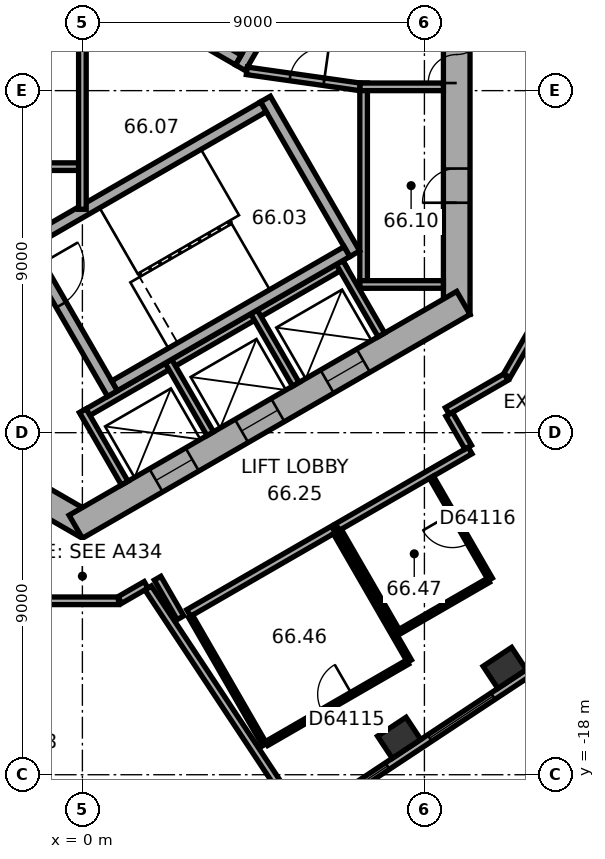
"""IFC4 building model, lengths in metres.
Left out: names, types, materials, properties, quantities, classifications, styles, units other than length and angle.
Written with IfcOpenShell. Run it as: python <this file> out.ifc"""

import sys

from ifc_helpers import new_model, si_unit, direction, frame, frame_2d, origin, origin_2d, place, context, subcontext, project, spatial, rectangle, extrude, element, fill, save


model = new_model("IFC4")
c1 = context("Model", 3, precision=1e-05, world=origin(), true_north=direction((0.0, 1.0)))
c2 = subcontext(c1, "Body", "Model", "MODEL_VIEW")
j1 = project(units=[si_unit("LENGTHUNIT", "METRE"), si_unit("PLANEANGLEUNIT", "RADIAN")], contexts=[c1])
p1 = place(None, origin())
s1 = spatial("IfcSite", under=j1, at=p1, CompositionType="ELEMENT")
p2 = place(p1, origin())
s2 = spatial("IfcBuilding", under=s1, at=p2, CompositionType="ELEMENT")
p3 = place(p2, frame((0.0, 0.0, 267.2)))
s3 = spatial("IfcBuildingStorey", under=s2, at=p3, CompositionType="ELEMENT", Elevation=267.2)
for number, where, z_axis, x_axis in (
    (1, (8.335, -17.028, 0.0), (0.0, 0.0, 1.0), (0.834, 0.552, 0.0)),
    (2, (11.113, -15.189, 0.0), (0.0, 0.0, 1.0), (0.834, 0.552, 0.0)),
):
    element("IfcColumn", number, at=place(p3, frame(where, z_axis=z_axis, x_axis=x_axis)), inside=s3, PredefinedType="COLUMN", context=c2, shape_type="SweptSolid", body=[
        extrude(rectangle(XDim=0.9, YDim=0.7, at=origin_2d()), origin(), (0.0, 0.0, 1.0), 3.7),
    ])
p4 = place(p3, frame((9.85, -5.889, 0.0), z_axis=(0.0, 0.0, 1.0), x_axis=(0.0, 1.0, 0.0)))
e3 = element("IfcWall", 3, at=p4, inside=s3, PredefinedType="SHEAR", context=c2, shape_type="SweptSolid", body=[
    extrude(rectangle(XDim=11.778, YDim=0.7, at=frame_2d((5.889, 0.0))), origin(), (0.0, 0.0, 1.0), 3.7),
])
p5 = place(p4, frame((6.089, 0.0, 0.0)))
e4 = element("IfcOpeningElement", 4, at=p5, cuts=e3, PredefinedType="OPENING", context=c2, shape_type="SweptSolid", body=[
    extrude(rectangle(XDim=1.5, YDim=2.1, at=frame_2d((0.75, 1.05))), frame((0.0, 0.36, 0.0), z_axis=(0.0, -1.0, 0.0), x_axis=(1.0, 0.0, 0.0)), (0.0, 0.0, 1.0), 0.72),
])
p6 = place(p4, frame((2.939, 0.0, 0.0)))
e5 = element("IfcOpeningElement", 5, at=p6, cuts=e3, PredefinedType="OPENING", context=c2, shape_type="SweptSolid", body=[
    extrude(rectangle(XDim=0.9, YDim=2.1, at=frame_2d((0.45, 1.05))), frame((0.0, 0.36, 0.0), z_axis=(0.0, -1.0, 0.0), x_axis=(1.0, 0.0, 0.0)), (0.0, 0.0, 1.0), 0.72),
])
p7 = place(p3, frame((-10.025, -5.586, 0.0), z_axis=(0.0, 0.0, 1.0), x_axis=(0.866026453023, -0.499998182661, 0.0)))
e6 = element("IfcWall", 6, at=p7, inside=s3, PredefinedType="SHEAR", context=c2, shape_type="SweptSolid", body=[
    extrude(rectangle(XDim=11.778, YDim=0.7, at=frame_2d((5.889, 0.0))), origin(), (0.0, 0.0, 1.0), 3.7),
])
p8 = place(p7, frame((6.089, 0.0, 0.0)))
e7 = element("IfcOpeningElement", 7, at=p8, cuts=e6, PredefinedType="OPENING", context=c2, shape_type="SweptSolid", body=[
    extrude(rectangle(XDim=1.5, YDim=2.1, at=frame_2d((0.75, 1.05))), frame((0.0, 0.36, 0.0), z_axis=(0.0, -1.0, 0.0), x_axis=(1.0, 0.0, 0.0)), (0.0, 0.0, 1.0), 0.72),
])
p9 = place(p7, frame((1.539, 0.0, 0.0)))
e8 = element("IfcOpeningElement", 8, at=p9, cuts=e6, PredefinedType="OPENING", context=c2, shape_type="SweptSolid", body=[
    extrude(rectangle(XDim=1.1, YDim=2.1, at=frame_2d((0.55, 1.05))), frame((0.0, 0.36, 0.0), z_axis=(0.0, -1.0, 0.0), x_axis=(1.0, 0.0, 0.0)), (0.0, 0.0, 1.0), 0.72),
])
p10 = place(p7, frame((4.139, 0.0, 0.0)))
e9 = element("IfcOpeningElement", 9, at=p10, cuts=e6, PredefinedType="OPENING", context=c2, shape_type="SweptSolid", body=[
    extrude(rectangle(XDim=1.1, YDim=2.1, at=frame_2d((0.55, 1.05))), frame((0.0, 0.36, 0.0), z_axis=(0.0, -1.0, 0.0), x_axis=(1.0, 0.0, 0.0)), (0.0, 0.0, 1.0), 0.72),
])
p11 = place(p3, frame((-0.175, -11.475, 0.0), z_axis=(0.0, 0.0, 1.0), x_axis=(0.866026453023, 0.499998182661, 0.0)))
e10 = element("IfcWall", 10, at=p11, inside=s3, PredefinedType="SHEAR", context=c2, shape_type="SweptSolid", body=[
    extrude(rectangle(XDim=11.778, YDim=0.7, at=frame_2d((5.889, 0.0))), origin(), (0.0, 0.0, 1.0), 3.7),
])
p12 = place(p11, frame((2.439, 0.0, 0.0)))
e11 = element("IfcOpeningElement", 11, at=p12, cuts=e10, PredefinedType="OPENING", context=c2, shape_type="SweptSolid", body=[
    extrude(rectangle(XDim=1.1, YDim=2.1, at=frame_2d((0.55, 1.05))), frame((0.0, 0.36, 0.0), z_axis=(0.0, -1.0, 0.0), x_axis=(1.0, 0.0, 0.0)), (0.0, 0.0, 1.0), 0.72),
])
p13 = place(p11, frame((5.039, 0.0, 0.0)))
e12 = element("IfcOpeningElement", 12, at=p13, cuts=e10, PredefinedType="OPENING", context=c2, shape_type="SweptSolid", body=[
    extrude(rectangle(XDim=1.1, YDim=2.1, at=frame_2d((0.55, 1.05))), frame((0.0, 0.36, 0.0), z_axis=(0.0, -1.0, 0.0), x_axis=(1.0, 0.0, 0.0)), (0.0, 0.0, 1.0), 0.72),
])
p14 = place(p11, frame((7.639, 0.0, 0.0)))
e13 = element("IfcOpeningElement", 13, at=p14, cuts=e10, PredefinedType="OPENING", context=c2, shape_type="SweptSolid", body=[
    extrude(rectangle(XDim=1.1, YDim=2.1, at=frame_2d((0.55, 1.05))), frame((0.0, 0.36, 0.0), z_axis=(0.0, -1.0, 0.0), x_axis=(1.0, 0.0, 0.0)), (0.0, 0.0, 1.0), 0.72),
])
p15 = place(p3, frame((2.58, -21.377, 0.0), z_axis=(0.0, 0.0, 1.0), x_axis=(0.833888592176, 0.551932800112, 0.0)))
e14 = element("IfcWall", 14, at=p15, inside=s3, PredefinedType="STANDARD", context=c2, shape_type="SweptSolid", body=[
    extrude(rectangle(XDim=17.731, YDim=0.2, at=frame_2d((8.866, 0.0))), origin(), (0.0, 0.0, 1.0), 3.7),
])
p16 = place(p15, frame((1.202, 0.0, 0.9)))
e15 = element("IfcOpeningElement", 15, at=p16, cuts=e14, PredefinedType="OPENING", context=c2, shape_type="SweptSolid", body=[
    extrude(rectangle(XDim=2.0, YDim=2.0, at=frame_2d((1.0, 1.0))), frame((0.0, 0.11, 0.0), z_axis=(0.0, -1.0, 0.0), x_axis=(1.0, 0.0, 0.0)), (0.0, 0.0, 1.0), 0.22),
])
p17 = place(p15, frame((4.533, 0.0, 0.9)))
e16 = element("IfcOpeningElement", 16, at=p17, cuts=e14, PredefinedType="OPENING", context=c2, shape_type="SweptSolid", body=[
    extrude(rectangle(XDim=2.0, YDim=2.0, at=frame_2d((1.0, 1.0))), frame((0.0, 0.11, 0.0), z_axis=(0.0, -1.0, 0.0), x_axis=(1.0, 0.0, 0.0)), (0.0, 0.0, 1.0), 0.22),
])
p18 = place(p15, frame((7.865, 0.0, 0.9)))
e17 = element("IfcOpeningElement", 17, at=p18, cuts=e14, PredefinedType="OPENING", context=c2, shape_type="SweptSolid", body=[
    extrude(rectangle(XDim=2.0, YDim=2.0, at=frame_2d((1.0, 1.0))), frame((0.0, 0.11, 0.0), z_axis=(0.0, -1.0, 0.0), x_axis=(1.0, 0.0, 0.0)), (0.0, 0.0, 1.0), 0.22),
])
p19 = place(p15, frame((11.197, 0.0, 0.9)))
e18 = element("IfcOpeningElement", 18, at=p19, cuts=e14, PredefinedType="OPENING", context=c2, shape_type="SweptSolid", body=[
    extrude(rectangle(XDim=2.0, YDim=2.0, at=frame_2d((1.0, 1.0))), frame((0.0, 0.11, 0.0), z_axis=(0.0, -1.0, 0.0), x_axis=(1.0, 0.0, 0.0)), (0.0, 0.0, 1.0), 0.22),
])
p20 = place(p15, frame((14.528, 0.0, 0.9)))
e19 = element("IfcOpeningElement", 19, at=p20, cuts=e14, PredefinedType="OPENING", context=c2, shape_type="SweptSolid", body=[
    extrude(rectangle(XDim=2.0, YDim=2.0, at=frame_2d((1.0, 1.0))), frame((0.0, 0.11, 0.0), z_axis=(0.0, -1.0, 0.0), x_axis=(1.0, 0.0, 0.0)), (0.0, 0.0, 1.0), 0.22),
])
p21 = place(p3, frame((7.4, -5.2, 0.0), z_axis=(0.0, 0.0, 1.0), x_axis=(0.0, 1.0, 0.0)))
e20 = element("IfcWall", 20, at=p21, inside=s3, PredefinedType="PARTITIONING", context=c2, shape_type="SweptSolid", body=[
    extrude(rectangle(XDim=5.4, YDim=0.2, at=frame_2d((2.7, 0.0))), origin(), (0.0, 0.0, 1.0), 3.42),
])
for number, where, z_axis, x_axis in (
    (21, (7.3, -5.1, 0.0), (0.0, 0.0, 1.0), (1.0, 0.0, 0.0)),
    (22, (7.3, 0.1, 0.0), (0.0, 0.0, 1.0), (1.0, 0.0, 0.0)),
):
    element("IfcWall", number, at=place(p3, frame(where, z_axis=z_axis, x_axis=x_axis)), inside=s3, PredefinedType="PARTITIONING", context=c2, shape_type="SweptSolid", body=[
        extrude(rectangle(XDim=2.2, YDim=0.2, at=frame_2d((1.1, 0.0))), origin(), (0.0, 0.0, 1.0), 3.42),
    ])
p22 = place(p3, frame((-0.024, -8.559, 0.0), z_axis=(0.0, 0.0, 1.0), x_axis=(0.866026010844, 0.49999894854, 0.0)))
e23 = element("IfcWall", 23, at=p22, inside=s3, PredefinedType="PARTITIONING", context=c2, shape_type="SweptSolid", body=[
    extrude(rectangle(XDim=8.0, YDim=0.2, at=frame_2d((4.0, 0.0))), origin(), (0.0, 0.0, 1.0), 3.42),
])
for number, where, z_axis, x_axis in (
    (24, (0.013, -8.422, 0.0), (0.0, 0.0, 1.0), (0.5, -0.866, 0.0)),
    (25, (2.264, -7.122, 0.0), (0.0, 0.0, 1.0), (0.5, -0.866, 0.0)),
    (26, (4.516, -5.822, 0.0), (0.0, 0.0, 1.0), (0.5, -0.866, 0.0)),
    (27, (6.768, -4.522, 0.0), (0.0, 0.0, 1.0), (0.5, -0.866, 0.0)),
):
    element("IfcWall", number, at=place(p3, frame(where, z_axis=z_axis, x_axis=x_axis)), inside=s3, PredefinedType="PARTITIONING", context=c2, shape_type="SweptSolid", body=[
        extrude(rectangle(XDim=2.2, YDim=0.2, at=frame_2d((1.1, 0.0))), origin(), (0.0, 0.0, 1.0), 3.42),
    ])
p23 = place(p3, frame((4.158, 0.602, 0.0), z_axis=(0.0, 0.0, 1.0), x_axis=(0.499977259774, 0.866038532462, 0.0)))
e28 = element("IfcWall", 28, at=p23, inside=s3, PredefinedType="SHEAR", context=c2, shape_type="SweptSolid", body=[
    extrude(rectangle(XDim=4.7, YDim=0.3, at=frame_2d((2.35, 0.0))), origin(), (0.0, 0.0, 1.0), 3.42),
])
p24 = place(p23, frame((0.8, 0.0, 0.0)))
e29 = element("IfcOpeningElement", 29, at=p24, cuts=e28, PredefinedType="OPENING", context=c2, shape_type="SweptSolid", body=[
    extrude(rectangle(XDim=1.2, YDim=2.1, at=frame_2d((0.6, 1.05))), frame((0.0, 0.16, 0.0), z_axis=(0.0, -1.0, 0.0), x_axis=(1.0, 0.0, 0.0)), (0.0, 0.0, 1.0), 0.32),
])
p25 = place(p3, frame((4.103, 0.807, 0.0), z_axis=(0.0, 0.0, 1.0), x_axis=(-0.866027801685, 0.499995846692, 0.0)))
e30 = element("IfcWall", 30, at=p25, inside=s3, PredefinedType="SHEAR", context=c2, shape_type="SweptSolid", body=[
    extrude(rectangle(XDim=7.06, YDim=0.3, at=frame_2d((3.53, 0.0))), origin(), (0.0, 0.0, 1.0), 3.42),
])
p26 = place(p3, frame((-1.558, -3.902, 0.0), z_axis=(0.0, 0.0, 1.0), x_axis=(0.499977259774, -0.866038532462, 0.0)))
e31 = element("IfcWall", 31, at=p26, inside=s3, PredefinedType="SHEAR", context=c2, shape_type="SweptSolid", body=[
    extrude(rectangle(XDim=4.7, YDim=0.3, at=frame_2d((2.35, 0.0))), origin(), (0.0, 0.0, 1.0), 3.42),
])
p27 = place(p26, frame((0.8, 0.0, 0.0)))
e32 = element("IfcOpeningElement", 32, at=p27, cuts=e31, PredefinedType="OPENING", context=c2, shape_type="SweptSolid", body=[
    extrude(rectangle(XDim=1.2, YDim=2.1, at=frame_2d((0.6, 1.05))), frame((0.0, 0.16, 0.0), z_axis=(0.0, -1.0, 0.0), x_axis=(1.0, 0.0, 0.0)), (0.0, 0.0, 1.0), 0.32),
])
p28 = place(p3, frame((4.816, -0.222, 0.0), z_axis=(0.0, 0.0, 1.0), x_axis=(0.499977259774, -0.866038532462, 0.0)))
e33 = element("IfcWall", 33, at=p28, inside=s3, PredefinedType="SHEAR", context=c2, shape_type="SweptSolid", body=[
    extrude(rectangle(XDim=4.7, YDim=0.3, at=frame_2d((2.35, 0.0))), origin(), (0.0, 0.0, 1.0), 3.42),
])
for number, where, z_axis, x_axis in (
    (34, (-1.353, -3.957, 0.0), (0.0, 0.0, 1.0), (0.866, 0.5, 0.0)),
    (35, (0.847, -7.767, 0.0), (0.0, 0.0, 1.0), (0.866, 0.5, 0.0)),
):
    element("IfcWall", number, at=place(p3, frame(where, z_axis=z_axis, x_axis=x_axis)), inside=s3, PredefinedType="SHEAR", context=c2, shape_type="SweptSolid", body=[
        extrude(rectangle(XDim=7.06, YDim=0.3, at=frame_2d((3.53, 0.0))), origin(), (0.0, 0.0, 1.0), 3.42),
    ])
p29 = place(p3, frame((4.327, 0.521, 0.0), z_axis=(0.0, 0.0, 1.0), x_axis=(0.990124376366, -0.14019172346, 0.0)))
e36 = element("IfcWall", 36, at=p29, inside=s3, PredefinedType="PARTITIONING", context=c2, shape_type="SweptSolid", body=[
    extrude(rectangle(XDim=3.002, YDim=0.2, at=frame_2d((1.501, 0.0))), origin(), (0.0, 0.0, 1.0), 3.42),
])
p30 = place(p29, frame((1.15, 0.0, 0.0)))
e37 = element("IfcOpeningElement", 37, at=p30, cuts=e36, PredefinedType="OPENING", context=c2, shape_type="SweptSolid", body=[
    extrude(rectangle(XDim=0.9, YDim=2.1, at=frame_2d((0.45, 1.05))), frame((0.0, 0.11, 0.0), z_axis=(0.0, -1.0, 0.0), x_axis=(1.0, 0.0, 0.0)), (0.0, 0.0, 1.0), 0.22),
])
p31 = place(p3, frame((-2.72, -2.0, 0.0), z_axis=(0.0, 0.0, 1.0), x_axis=(1.0, 0.0, 0.0)))
e38 = element("IfcWall", 38, at=p31, inside=s3, PredefinedType="PARTITIONING", context=c2, shape_type="SweptSolid", body=[
    extrude(rectangle(XDim=2.62, YDim=0.2, at=frame_2d((1.31, 0.0))), origin(), (0.0, 0.0, 1.0), 3.42),
])
p32 = place(p3, frame((0.0, -3.122, 0.0), z_axis=(0.0, 0.0, 1.0), x_axis=(0.0, 1.0, 0.0)))
e39 = element("IfcWall", 39, at=p32, inside=s3, PredefinedType="PARTITIONING", context=c2, shape_type="SweptSolid", body=[
    extrude(rectangle(XDim=6.245, YDim=0.2, at=frame_2d((3.122, 0.0))), origin(), (0.0, 0.0, 1.0), 3.42),
])
p33 = place(p3, frame((-0.91, -13.423, 0.0), z_axis=(0.0, 0.0, 1.0), x_axis=(1.0, 0.0, 0.0)))
e40 = element("IfcWall", 40, at=p33, inside=s3, PredefinedType="PARTITIONING", context=c2, shape_type="SweptSolid", body=[
    extrude(rectangle(XDim=1.86, YDim=0.2, at=frame_2d((0.93, 0.0))), origin(), (0.0, 0.0, 1.0), 3.42),
])
p34 = place(p3, frame((0.985, -13.403, 0.0), z_axis=(0.0, 0.0, 1.0), x_axis=(0.866032814021, 0.499987164874, 0.0)))
e41 = element("IfcWall", 41, at=p34, inside=s3, PredefinedType="PARTITIONING", context=c2, shape_type="SweptSolid", body=[
    extrude(rectangle(XDim=0.798, YDim=0.2, at=frame_2d((0.399, 0.0))), origin(), (0.0, 0.0, 1.0), 3.42),
])
p35 = place(p3, frame((1.979, -12.829, 0.0), z_axis=(0.0, 0.0, 1.0), x_axis=(0.500074377092, -0.865982457891, 0.0)))
e42 = element("IfcWall", 42, at=p35, inside=s3, PredefinedType="PARTITIONING", context=c2, shape_type="SweptSolid", body=[
    extrude(rectangle(XDim=1.201, YDim=0.2, at=frame_2d((0.601, 0.0))), origin(), (0.0, 0.0, 1.0), 3.42),
])
p36 = place(p3, frame((2.796, -13.744, 0.0), z_axis=(0.0, 0.0, 1.0), x_axis=(0.866018331238, 0.50001224981, 0.0)))
e43 = element("IfcWall", 43, at=p36, inside=s3, PredefinedType="PARTITIONING", context=c2, shape_type="SweptSolid", body=[
    extrude(rectangle(XDim=4.4, YDim=0.2, at=frame_2d((2.2, 0.0))), origin(), (0.0, 0.0, 1.0), 3.42),
])
p37 = place(p3, frame((4.796, -17.208, 0.0), z_axis=(0.0, 0.0, 1.0), x_axis=(-0.500043961785, 0.866000020948, 0.0)))
e44 = element("IfcWall", 44, at=p37, inside=s3, PredefinedType="PARTITIONING", context=c2, shape_type="SweptSolid", body=[
    extrude(rectangle(XDim=3.9, YDim=0.12, at=frame_2d((1.95, 0.0))), origin(), (0.0, 0.0, 1.0), 3.42),
])
p38 = place(p3, frame((5.364, -18.575, 0.0), z_axis=(0.0, 0.0, 1.0), x_axis=(-0.55195757761, 0.833872191957, 0.0)))
e45 = element("IfcWall", 45, at=p38, inside=s3, PredefinedType="PARTITIONING", context=c2, shape_type="SweptSolid", body=[
    extrude(rectangle(XDim=6.581, YDim=0.2, at=frame_2d((3.291, 0.0))), origin(), (0.0, 0.0, 1.0), 3.42),
])
p39 = place(p3, frame((6.656, -11.631, 0.0), z_axis=(0.0, 0.0, 1.0), x_axis=(0.499997012787, -0.866027128446, 0.0)))
e46 = element("IfcWall", 46, at=p39, inside=s3, PredefinedType="PARTITIONING", context=c2, shape_type="SweptSolid", body=[
    extrude(rectangle(XDim=3.9, YDim=0.12, at=frame_2d((1.95, 0.0))), origin(), (0.0, 0.0, 1.0), 3.42),
])
p40 = place(p3, frame((6.71, -11.485, 0.0), z_axis=(0.0, 0.0, 1.0), x_axis=(0.866021232452, 0.500007224889, 0.0)))
e47 = element("IfcWall", 47, at=p40, inside=s3, PredefinedType="PARTITIONING", context=c2, shape_type="SweptSolid", body=[
    extrude(rectangle(XDim=4.032, YDim=0.2, at=frame_2d((2.016, 0.0))), origin(), (0.0, 0.0, 1.0), 3.42),
])
p41 = place(p3, frame((8.31, -14.256, 0.0), z_axis=(0.0, 0.0, 1.0), x_axis=(-0.49999285859, 0.86602952684, 0.0)))
e48 = element("IfcWall", 48, at=p41, inside=s3, PredefinedType="PARTITIONING", context=c2, shape_type="SweptSolid", body=[
    extrude(rectangle(XDim=3.1, YDim=0.12, at=frame_2d((1.55, 0.0))), origin(), (0.0, 0.0, 1.0), 3.42),
])
p42 = place(p3, frame((8.554, -15.039, 0.0), z_axis=(0.0, 0.0, 1.0), x_axis=(-0.865994635417, -0.500053288589, 0.0)))
e49 = element("IfcWall", 49, at=p42, inside=s3, PredefinedType="PARTITIONING", context=c2, shape_type="SweptSolid", body=[
    extrude(rectangle(XDim=4.28, YDim=0.12, at=frame_2d((2.14, 0.0))), origin(), (0.0, 0.0, 1.0), 3.42),
])
p43 = place(p42, frame((1.69, 0.0, 0.0)))
e50 = element("IfcOpeningElement", 50, at=p43, cuts=e49, PredefinedType="OPENING", context=c2, shape_type="SweptSolid", body=[
    extrude(rectangle(XDim=0.9, YDim=2.1, at=frame_2d((0.45, 1.05))), frame((0.0, 0.07, 0.0), z_axis=(0.0, -1.0, 0.0), x_axis=(1.0, 0.0, 0.0)), (0.0, 0.0, 1.0), 0.14),
])
p44 = place(p3, frame((9.185, -10.171, 0.0), z_axis=(0.0, 0.0, 1.0), x_axis=(0.500026960575, -0.86600983753, 0.0)))
e51 = element("IfcWall", 51, at=p44, inside=s3, PredefinedType="PARTITIONING", context=c2, shape_type="SweptSolid", body=[
    extrude(rectangle(XDim=3.1, YDim=0.12, at=frame_2d((1.55, 0.0))), origin(), (0.0, 0.0, 1.0), 3.42),
])
p45 = place(p44, frame((1.1, 0.0, 0.0)))
e52 = element("IfcOpeningElement", 52, at=p45, cuts=e51, PredefinedType="OPENING", context=c2, shape_type="SweptSolid", body=[
    extrude(rectangle(XDim=0.9, YDim=2.1, at=frame_2d((0.45, 1.05))), frame((0.0, 0.07, 0.0), z_axis=(0.0, -1.0, 0.0), x_axis=(1.0, 0.0, 0.0)), (0.0, 0.0, 1.0), 0.14),
])
p46 = place(p3, frame((9.602, -8.428, 0.0), z_axis=(0.0, 0.0, 1.0), x_axis=(0.865999114786, 0.500045531117, 0.0)))
e53 = element("IfcWall", 53, at=p46, inside=s3, PredefinedType="PARTITIONING", context=c2, shape_type="SweptSolid", body=[
    extrude(rectangle(XDim=1.788, YDim=0.2, at=frame_2d((0.894, 0.0))), origin(), (0.0, 0.0, 1.0), 3.42),
])
p47 = place(p3, frame((10.152, -9.382, 0.0), z_axis=(0.0, 0.0, 1.0), x_axis=(-0.499968756647, 0.866043441391, 0.0)))
e54 = element("IfcWall", 54, at=p47, inside=s3, PredefinedType="PARTITIONING", context=c2, shape_type="SweptSolid", body=[
    extrude(rectangle(XDim=1.001, YDim=0.2, at=frame_2d((0.5, 0.0))), origin(), (0.0, 0.0, 1.0), 3.42),
])
p48 = place(p3, frame((10.683, -12.886, 0.0), z_axis=(0.0, 0.0, 1.0), x_axis=(-0.86599746015, -0.500048396672, 0.0)))
e55 = element("IfcWall", 55, at=p48, inside=s3, PredefinedType="PARTITIONING", context=c2, shape_type="SweptSolid", body=[
    extrude(rectangle(XDim=2.68, YDim=0.12, at=frame_2d((1.34, 0.0))), origin(), (0.0, 0.0, 1.0), 3.42),
])
p49 = place(p3, frame((11.17, -7.5, 0.0), z_axis=(0.0, 0.0, 1.0), x_axis=(0.500006454166, 0.866021677438, 0.0)))
e56 = element("IfcWall", 56, at=p49, inside=s3, PredefinedType="PARTITIONING", context=c2, shape_type="SweptSolid", body=[
    extrude(rectangle(XDim=1.86, YDim=0.2, at=frame_2d((0.93, 0.0))), origin(), (0.0, 0.0, 1.0), 3.42),
])
p50 = place(p17, origin())
e57 = element("IfcWindow", 57, at=p50, inside=s3, PartitioningType="SINGLE_PANEL", PredefinedType="WINDOW", context=c2, shape_type="SweptSolid", body=[
    extrude(rectangle(XDim=2.0, YDim=2.0, at=frame_2d((1.0, 1.0))), frame((0.0, 0.03, 0.0), z_axis=(0.0, -1.0, 0.0), x_axis=(1.0, 0.0, 0.0)), (0.0, 0.0, 1.0), 0.06),
])
fill(e16, e57)
p51 = place(p18, origin())
e58 = element("IfcWindow", 58, at=p51, inside=s3, PartitioningType="SINGLE_PANEL", PredefinedType="WINDOW", context=c2, shape_type="SweptSolid", body=[
    extrude(rectangle(XDim=2.0, YDim=2.0, at=frame_2d((1.0, 1.0))), frame((0.0, 0.03, 0.0), z_axis=(0.0, -1.0, 0.0), x_axis=(1.0, 0.0, 0.0)), (0.0, 0.0, 1.0), 0.06),
])
fill(e17, e58)
p52 = place(p5, origin())
e59 = element("IfcDoor", 59, at=p52, inside=s3, OperationType="DOUBLE_DOOR_SINGLE_SWING", PredefinedType="DOOR", context=c2, shape_type="SweptSolid", body=[
    extrude(rectangle(XDim=1.5, YDim=2.1, at=frame_2d((0.75, 1.05))), frame((0.0, 0.025, 0.0), z_axis=(0.0, -1.0, 0.0), x_axis=(1.0, 0.0, 0.0)), (0.0, 0.0, 1.0), 0.05),
])
fill(e4, e59)
p53 = place(p27, origin())
e60 = element("IfcDoor", 60, at=p53, inside=s3, OperationType="SINGLE_SWING_RIGHT", PredefinedType="DOOR", context=c2, shape_type="SweptSolid", body=[
    extrude(rectangle(XDim=1.2, YDim=2.1, at=frame_2d((0.6, 1.05))), frame((0.0, 0.025, 0.0), z_axis=(0.0, -1.0, 0.0), x_axis=(1.0, 0.0, 0.0)), (0.0, 0.0, 1.0), 0.05),
])
fill(e32, e60)
p54 = place(p30, origin())
e61 = element("IfcDoor", 61, at=p54, inside=s3, OperationType="SINGLE_SWING_LEFT", PredefinedType="DOOR", context=c2, shape_type="SweptSolid", body=[
    extrude(rectangle(XDim=0.9, YDim=2.1, at=frame_2d((0.45, 1.05))), frame((0.0, 0.025, 0.0), z_axis=(0.0, -1.0, 0.0), x_axis=(1.0, 0.0, 0.0)), (0.0, 0.0, 1.0), 0.05),
])
fill(e37, e61)
p55 = place(p6, origin())
e62 = element("IfcDoor", 62, at=p55, inside=s3, OperationType="SINGLE_SWING_LEFT", PredefinedType="DOOR", context=c2, shape_type="SweptSolid", body=[
    extrude(rectangle(XDim=0.9, YDim=2.1, at=frame_2d((0.45, 1.05))), frame((0.0, 0.025, 0.0), z_axis=(0.0, -1.0, 0.0), x_axis=(1.0, 0.0, 0.0)), (0.0, 0.0, 1.0), 0.05),
])
fill(e5, e62)
p56 = place(p12, origin())
e63 = element("IfcDoor", 63, at=p56, inside=s3, OperationType="DOUBLE_DOOR_SLIDING", PredefinedType="DOOR", context=c2, shape_type="SweptSolid", body=[
    extrude(rectangle(XDim=1.1, YDim=2.1, at=frame_2d((0.55, 1.05))), frame((0.0, 0.025, 0.0), z_axis=(0.0, -1.0, 0.0), x_axis=(1.0, 0.0, 0.0)), (0.0, 0.0, 1.0), 0.05),
])
fill(e11, e63)
p57 = place(p13, origin())
e64 = element("IfcDoor", 64, at=p57, inside=s3, OperationType="DOUBLE_DOOR_SLIDING", PredefinedType="DOOR", context=c2, shape_type="SweptSolid", body=[
    extrude(rectangle(XDim=1.1, YDim=2.1, at=frame_2d((0.55, 1.05))), frame((0.0, 0.025, 0.0), z_axis=(0.0, -1.0, 0.0), x_axis=(1.0, 0.0, 0.0)), (0.0, 0.0, 1.0), 0.05),
])
fill(e12, e64)
p58 = place(p14, origin())
e65 = element("IfcDoor", 65, at=p58, inside=s3, OperationType="DOUBLE_DOOR_SLIDING", PredefinedType="DOOR", context=c2, shape_type="SweptSolid", body=[
    extrude(rectangle(XDim=1.1, YDim=2.1, at=frame_2d((0.55, 1.05))), frame((0.0, 0.025, 0.0), z_axis=(0.0, -1.0, 0.0), x_axis=(1.0, 0.0, 0.0)), (0.0, 0.0, 1.0), 0.05),
])
fill(e13, e65)
p59 = place(p43, origin())
e66 = element("IfcDoor", 66, at=p59, inside=s3, OperationType="SINGLE_SWING_LEFT", PredefinedType="DOOR", context=c2, shape_type="SweptSolid", body=[
    extrude(rectangle(XDim=0.9, YDim=2.1, at=frame_2d((0.45, 1.05))), frame((0.0, 0.025, 0.0), z_axis=(0.0, -1.0, 0.0), x_axis=(1.0, 0.0, 0.0)), (0.0, 0.0, 1.0), 0.05),
])
fill(e50, e66)
p60 = place(p45, origin())
e67 = element("IfcDoor", 67, at=p60, inside=s3, OperationType="SINGLE_SWING_LEFT", PredefinedType="DOOR", context=c2, shape_type="SweptSolid", body=[
    extrude(rectangle(XDim=0.9, YDim=2.1, at=frame_2d((0.45, 1.05))), frame((0.0, 0.025, 0.0), z_axis=(0.0, -1.0, 0.0), x_axis=(1.0, 0.0, 0.0)), (0.0, 0.0, 1.0), 0.05),
])
fill(e52, e67)
save(model, sys.argv[1])
